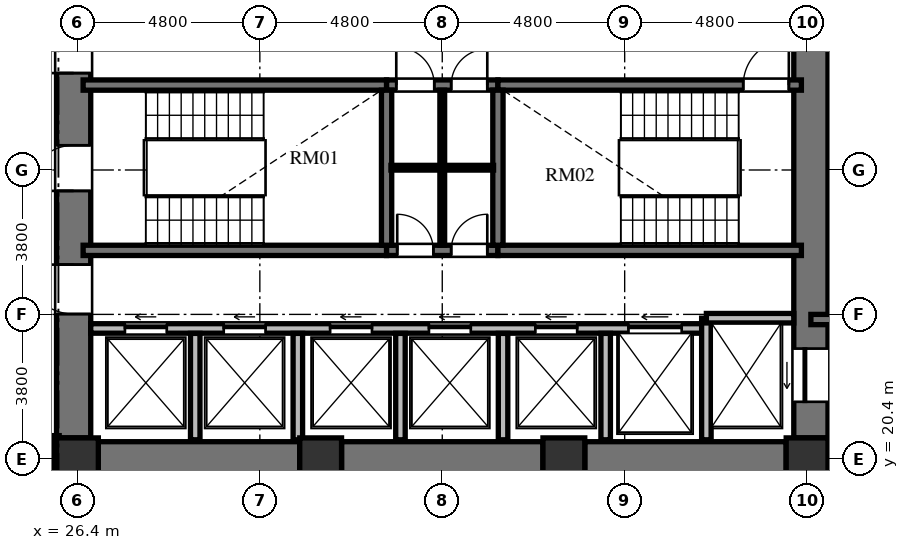
"""IFC4 building model, lengths in metres.
Left out: names, types, materials, properties, quantities, classifications, styles, units other than length and angle.
Written with IfcOpenShell. Run it as: python <this file> out.ifc"""

import sys

from ifc_helpers import new_model, si_unit, direction, frame, frame_2d, origin, origin_2d, place, context, subcontext, project, spatial, rectangle, extrude, element, fill, save


model = new_model("IFC4")
c1 = context("Model", 3, precision=1e-05, world=origin(), true_north=direction((0.0, 1.0)))
c2 = subcontext(c1, "Body", "Model", "MODEL_VIEW")
j1 = project(units=[si_unit("LENGTHUNIT", "METRE"), si_unit("PLANEANGLEUNIT", "RADIAN")], contexts=[c1])
p1 = place(None, origin())
s1 = spatial("IfcSite", under=j1, at=p1, CompositionType="ELEMENT")
p2 = place(p1, origin())
s2 = spatial("IfcBuilding", under=s1, at=p2, CompositionType="ELEMENT")
p3 = place(p2, frame((0.0, 0.0, 39.792)))
s3 = spatial("IfcBuildingStorey", under=s2, at=p3, CompositionType="ELEMENT", Elevation=39.792)
for number, where, z_axis, x_axis in (
    (1, (26.4, 20.4, 0.0), (0.0, 0.0, 1.0), (1.0, 0.0, 0.0)),
    (2, (32.8, 20.4, 0.0), (0.0, 0.0, 1.0), (1.0, 0.0, 0.0)),
    (3, (39.2, 20.4, 0.0), (0.0, 0.0, 1.0), (1.0, 0.0, 0.0)),
    (4, (45.6, 20.4, 0.0), (0.0, 0.0, 1.0), (1.0, 0.0, 0.0)),
):
    element("IfcColumn", number, at=place(p3, frame(where, z_axis=z_axis, x_axis=x_axis)), inside=s3, PredefinedType="COLUMN", context=c2, shape_type="SweptSolid", body=[
        extrude(rectangle(XDim=1.1, YDim=1.1, at=origin_2d()), origin(), (0.0, 0.0, 1.0), 3.648),
    ])
p4 = place(p3, frame((26.3, 20.95, 0.0), z_axis=(0.0, 0.0, 1.0), x_axis=(0.0, 1.0, 0.0)))
e5 = element("IfcWall", 5, at=p4, inside=s3, PredefinedType="SHEAR", context=c2, shape_type="SweptSolid", body=[
    extrude(rectangle(XDim=14.1, YDim=0.9, at=frame_2d((7.05, 0.0))), origin(), (0.0, 0.0, 1.0), 3.648),
])
p5 = place(p4, frame((6.5, 0.0, 0.0)))
e6 = element("IfcOpeningElement", 6, at=p5, cuts=e5, PredefinedType="OPENING", context=c2, shape_type="SweptSolid", body=[
    extrude(rectangle(XDim=1.2, YDim=2.15, at=frame_2d((0.6, 1.075))), frame((0.0, 0.46, 0.0), z_axis=(0.0, -1.0, 0.0), x_axis=(1.0, 0.0, 0.0)), (0.0, 0.0, 1.0), 0.92),
])
p6 = place(p4, frame((9.6, 0.0, 0.0)))
e7 = element("IfcOpeningElement", 7, at=p6, cuts=e5, PredefinedType="OPENING", context=c2, shape_type="SweptSolid", body=[
    extrude(rectangle(XDim=1.3, YDim=2.2, at=frame_2d((0.65, 1.1))), frame((0.0, 0.46, 0.0), z_axis=(0.0, -1.0, 0.0), x_axis=(1.0, 0.0, 0.0)), (0.0, 0.0, 1.0), 0.92),
])
p7 = place(p4, frame((3.26, 0.0, 0.0)))
e8 = element("IfcOpeningElement", 8, at=p7, cuts=e5, PredefinedType="OPENING", context=c2, shape_type="SweptSolid", body=[
    extrude(rectangle(XDim=1.3, YDim=2.2, at=frame_2d((0.65, 1.1))), frame((0.0, 0.46, 0.0), z_axis=(0.0, -1.0, 0.0), x_axis=(1.0, 0.0, 0.0)), (0.0, 0.0, 1.0), 0.92),
])
p8 = place(p3, frame((45.7, 20.95, 0.0), z_axis=(0.0, 0.0, 1.0), x_axis=(0.0, 1.0, 0.0)))
e9 = element("IfcWall", 9, at=p8, inside=s3, PredefinedType="SHEAR", context=c2, shape_type="SweptSolid", body=[
    extrude(rectangle(XDim=14.1, YDim=0.9, at=frame_2d((7.05, 0.0))), origin(), (0.0, 0.0, 1.0), 3.648),
])
p9 = place(p8, frame((11.75, 0.0, 0.0)))
e10 = element("IfcOpeningElement", 10, at=p9, cuts=e9, PredefinedType="OPENING", context=c2, shape_type="SweptSolid", body=[
    extrude(rectangle(XDim=1.4, YDim=2.3, at=frame_2d((0.7, 1.15))), frame((0.0, 0.46, 0.0), z_axis=(0.0, -1.0, 0.0), x_axis=(1.0, 0.0, 0.0)), (0.0, 0.0, 1.0), 0.92),
])
p10 = place(p8, frame((0.95, 0.0, 0.0)))
e11 = element("IfcOpeningElement", 11, at=p10, cuts=e9, PredefinedType="OPENING", context=c2, shape_type="SweptSolid", body=[
    extrude(rectangle(XDim=1.4, YDim=2.3, at=frame_2d((0.7, 1.15))), frame((0.0, 0.46, 0.0), z_axis=(0.0, -1.0, 0.0), x_axis=(1.0, 0.0, 0.0)), (0.0, 0.0, 1.0), 0.92),
])
p11 = place(p3, frame((26.95, 20.4, 0.0), z_axis=(0.0, 0.0, 1.0), x_axis=(1.0, 0.0, 0.0)))
e12 = element("IfcWall", 12, at=p11, inside=s3, PredefinedType="SHEAR", context=c2, shape_type="SweptSolid", body=[
    extrude(rectangle(XDim=5.3, YDim=0.9, at=frame_2d((2.65, 0.0))), origin(), (0.0, 0.0, 1.0), 3.648),
])
p12 = place(p3, frame((33.35, 20.4, 0.0), z_axis=(0.0, 0.0, 1.0), x_axis=(1.0, 0.0, 0.0)))
e13 = element("IfcWall", 13, at=p12, inside=s3, PredefinedType="SHEAR", context=c2, shape_type="SweptSolid", body=[
    extrude(rectangle(XDim=5.3, YDim=0.9, at=frame_2d((2.65, 0.0))), origin(), (0.0, 0.0, 1.0), 3.648),
])
p13 = place(p3, frame((39.75, 20.4, 0.0), z_axis=(0.0, 0.0, 1.0), x_axis=(1.0, 0.0, 0.0)))
e14 = element("IfcWall", 14, at=p13, inside=s3, PredefinedType="SHEAR", context=c2, shape_type="SweptSolid", body=[
    extrude(rectangle(XDim=5.3, YDim=0.9, at=frame_2d((2.65, 0.0))), origin(), (0.0, 0.0, 1.0), 3.648),
])
p14 = place(p3, frame((26.55, 30.235, 0.0), z_axis=(0.0, 0.0, 1.0), x_axis=(1.0, 0.0, 0.0)))
e15 = element("IfcWall", 15, at=p14, inside=s3, PredefinedType="SHEAR", context=c2, shape_type="SweptSolid", body=[
    extrude(rectangle(XDim=7.985, YDim=0.27, at=frame_2d((3.992, 0.0))), origin(), (0.0, 0.0, 1.0), 3.648),
])
p15 = place(p3, frame((34.535, 30.235, 0.0), z_axis=(0.0, 0.0, 1.0), x_axis=(1.0, 0.0, 0.0)))
e16 = element("IfcWall", 16, at=p15, inside=s3, PredefinedType="SHEAR", context=c2, shape_type="SweptSolid", body=[
    extrude(rectangle(XDim=2.93, YDim=0.27, at=frame_2d((1.465, 0.0))), origin(), (0.0, 0.0, 1.0), 3.648),
])
p16 = place(p15, frame((0.255, 0.0, 0.0)))
e17 = element("IfcOpeningElement", 17, at=p16, cuts=e16, PredefinedType="OPENING", context=c2, shape_type="SweptSolid", body=[
    extrude(rectangle(XDim=1.0, YDim=2.1, at=frame_2d((0.5, 1.05))), frame((0.0, 0.145, 0.0), z_axis=(0.0, -1.0, 0.0), x_axis=(1.0, 0.0, 0.0)), (0.0, 0.0, 1.0), 0.29),
])
p17 = place(p15, frame((1.7, 0.0, 0.0)))
e18 = element("IfcOpeningElement", 18, at=p17, cuts=e16, PredefinedType="OPENING", context=c2, shape_type="SweptSolid", body=[
    extrude(rectangle(XDim=0.95, YDim=2.1, at=frame_2d((0.475, 1.05))), frame((0.0, 0.145, 0.0), z_axis=(0.0, -1.0, 0.0), x_axis=(1.0, 0.0, 0.0)), (0.0, 0.0, 1.0), 0.29),
])
p18 = place(p3, frame((37.465, 30.235, 0.0), z_axis=(0.0, 0.0, 1.0), x_axis=(1.0, 0.0, 0.0)))
e19 = element("IfcWall", 19, at=p18, inside=s3, PredefinedType="SHEAR", context=c2, shape_type="SweptSolid", body=[
    extrude(rectangle(XDim=7.985, YDim=0.27, at=frame_2d((3.992, 0.0))), origin(), (0.0, 0.0, 1.0), 3.648),
])
p19 = place(p18, frame((6.455, 0.0, 0.0)))
e20 = element("IfcOpeningElement", 20, at=p19, cuts=e19, PredefinedType="OPENING", context=c2, shape_type="SweptSolid", body=[
    extrude(rectangle(XDim=1.2, YDim=2.15, at=frame_2d((0.6, 1.075))), frame((0.0, 0.145, 0.0), z_axis=(0.0, -1.0, 0.0), x_axis=(1.0, 0.0, 0.0)), (0.0, 0.0, 1.0), 0.29),
])
p20 = place(p3, frame((26.55, 25.885, 0.0), z_axis=(0.0, 0.0, 1.0), x_axis=(1.0, 0.0, 0.0)))
e21 = element("IfcWall", 21, at=p20, inside=s3, PredefinedType="SHEAR", context=c2, shape_type="SweptSolid", body=[
    extrude(rectangle(XDim=7.985, YDim=0.27, at=frame_2d((3.992, 0.0))), origin(), (0.0, 0.0, 1.0), 3.648),
])
p21 = place(p3, frame((34.535, 25.885, 0.0), z_axis=(0.0, 0.0, 1.0), x_axis=(1.0, 0.0, 0.0)))
e22 = element("IfcWall", 22, at=p21, inside=s3, PredefinedType="SHEAR", context=c2, shape_type="SweptSolid", body=[
    extrude(rectangle(XDim=2.93, YDim=0.27, at=frame_2d((1.465, 0.0))), origin(), (0.0, 0.0, 1.0), 3.648),
])
p22 = place(p21, frame((0.28, 0.0, 0.0)))
e23 = element("IfcOpeningElement", 23, at=p22, cuts=e22, PredefinedType="OPENING", context=c2, shape_type="SweptSolid", body=[
    extrude(rectangle(XDim=0.95, YDim=2.1, at=frame_2d((0.475, 1.05))), frame((0.0, 0.145, 0.0), z_axis=(0.0, -1.0, 0.0), x_axis=(1.0, 0.0, 0.0)), (0.0, 0.0, 1.0), 0.29),
])
p23 = place(p21, frame((1.7, 0.0, 0.0)))
e24 = element("IfcOpeningElement", 24, at=p23, cuts=e22, PredefinedType="OPENING", context=c2, shape_type="SweptSolid", body=[
    extrude(rectangle(XDim=0.95, YDim=2.1, at=frame_2d((0.475, 1.05))), frame((0.0, 0.145, 0.0), z_axis=(0.0, -1.0, 0.0), x_axis=(1.0, 0.0, 0.0)), (0.0, 0.0, 1.0), 0.29),
])
p24 = place(p3, frame((37.465, 25.885, 0.0), z_axis=(0.0, 0.0, 1.0), x_axis=(1.0, 0.0, 0.0)))
e25 = element("IfcWall", 25, at=p24, inside=s3, PredefinedType="SHEAR", context=c2, shape_type="SweptSolid", body=[
    extrude(rectangle(XDim=7.985, YDim=0.27, at=frame_2d((3.992, 0.0))), origin(), (0.0, 0.0, 1.0), 3.648),
])
for number, where, z_axis, x_axis in (
    (26, (34.535, 26.02, 0.0), (0.0, 0.0, 1.0), (0.0, 1.0, 0.0)),
    (27, (37.465, 26.02, 0.0), (0.0, 0.0, 1.0), (0.0, 1.0, 0.0)),
):
    element("IfcWall", number, at=place(p3, frame(where, z_axis=z_axis, x_axis=x_axis)), inside=s3, PredefinedType="SHEAR", context=c2, shape_type="SweptSolid", body=[
        extrude(rectangle(XDim=4.08, YDim=0.27, at=frame_2d((2.04, 0.0))), origin(), (0.0, 0.0, 1.0), 3.648),
    ])
p25 = place(p3, frame((34.65, 28.06, 0.0), z_axis=(0.0, 0.0, 1.0), x_axis=(1.0, 0.0, 0.0)))
e28 = element("IfcWall", 28, at=p25, inside=s3, PredefinedType="PARTITIONING", context=c2, shape_type="SweptSolid", body=[
    extrude(rectangle(XDim=2.7, YDim=0.125, at=frame_2d((1.35, 0.0))), origin(), (0.0, 0.0, 1.0), 3.428),
])
p26 = place(p3, frame((36.0, 26.02, 0.0), z_axis=(0.0, 0.0, 1.0), x_axis=(0.0, 1.0, 0.0)))
e29 = element("IfcWall", 29, at=p26, inside=s3, PredefinedType="PARTITIONING", context=c2, shape_type="SweptSolid", body=[
    extrude(rectangle(XDim=4.08, YDim=0.125, at=frame_2d((2.04, 0.0))), origin(), (0.0, 0.0, 1.0), 3.428),
])
p27 = place(p3, frame((26.75, 23.83, 0.0), z_axis=(0.0, 0.0, 1.0), x_axis=(1.0, 0.0, 0.0)))
e30 = element("IfcWall", 30, at=p27, inside=s3, PredefinedType="SOLIDWALL", context=c2, shape_type="SweptSolid", body=[
    extrude(rectangle(XDim=16.2, YDim=0.25, at=frame_2d((8.1, 0.0))), origin(), (0.0, 0.0, 1.0), 3.428),
])
p28 = place(p27, frame((0.9, 0.0, 0.0)))
e31 = element("IfcOpeningElement", 31, at=p28, cuts=e30, PredefinedType="OPENING", context=c2, shape_type="SweptSolid", body=[
    extrude(rectangle(XDim=1.1, YDim=2.2, at=frame_2d((0.55, 1.1))), frame((0.0, 0.135, 0.0), z_axis=(0.0, -1.0, 0.0), x_axis=(1.0, 0.0, 0.0)), (0.0, 0.0, 1.0), 0.27),
])
p29 = place(p27, frame((3.5, 0.0, 0.0)))
e32 = element("IfcOpeningElement", 32, at=p29, cuts=e30, PredefinedType="OPENING", context=c2, shape_type="SweptSolid", body=[
    extrude(rectangle(XDim=1.1, YDim=2.2, at=frame_2d((0.55, 1.1))), frame((0.0, 0.135, 0.0), z_axis=(0.0, -1.0, 0.0), x_axis=(1.0, 0.0, 0.0)), (0.0, 0.0, 1.0), 0.27),
])
p30 = place(p27, frame((6.3, 0.0, 0.0)))
e33 = element("IfcOpeningElement", 33, at=p30, cuts=e30, PredefinedType="OPENING", context=c2, shape_type="SweptSolid", body=[
    extrude(rectangle(XDim=1.1, YDim=2.2, at=frame_2d((0.55, 1.1))), frame((0.0, 0.135, 0.0), z_axis=(0.0, -1.0, 0.0), x_axis=(1.0, 0.0, 0.0)), (0.0, 0.0, 1.0), 0.27),
])
p31 = place(p27, frame((8.9, 0.0, 0.0)))
e34 = element("IfcOpeningElement", 34, at=p31, cuts=e30, PredefinedType="OPENING", context=c2, shape_type="SweptSolid", body=[
    extrude(rectangle(XDim=1.1, YDim=2.2, at=frame_2d((0.55, 1.1))), frame((0.0, 0.135, 0.0), z_axis=(0.0, -1.0, 0.0), x_axis=(1.0, 0.0, 0.0)), (0.0, 0.0, 1.0), 0.27),
])
p32 = place(p27, frame((11.7, 0.0, 0.0)))
e35 = element("IfcOpeningElement", 35, at=p32, cuts=e30, PredefinedType="OPENING", context=c2, shape_type="SweptSolid", body=[
    extrude(rectangle(XDim=1.1, YDim=2.2, at=frame_2d((0.55, 1.1))), frame((0.0, 0.135, 0.0), z_axis=(0.0, -1.0, 0.0), x_axis=(1.0, 0.0, 0.0)), (0.0, 0.0, 1.0), 0.27),
])
p33 = place(p27, frame((14.15, 0.0, 0.0)))
e36 = element("IfcOpeningElement", 36, at=p33, cuts=e30, PredefinedType="OPENING", context=c2, shape_type="SweptSolid", body=[
    extrude(rectangle(XDim=1.4, YDim=2.3, at=frame_2d((0.7, 1.15))), frame((0.0, 0.135, 0.0), z_axis=(0.0, -1.0, 0.0), x_axis=(1.0, 0.0, 0.0)), (0.0, 0.0, 1.0), 0.27),
])
p34 = place(p3, frame((42.95, 20.9, 0.0), z_axis=(0.0, 0.0, 1.0), x_axis=(0.0, 1.0, 0.0)))
e37 = element("IfcWall", 37, at=p34, inside=s3, PredefinedType="SOLIDWALL", context=c2, shape_type="SweptSolid", body=[
    extrude(rectangle(XDim=3.2, YDim=0.25, at=frame_2d((1.6, 0.0))), origin(), (0.0, 0.0, 1.0), 3.428),
])
p35 = place(p3, frame((42.95, 24.1, 0.0), z_axis=(0.0, 0.0, 1.0), x_axis=(1.0, 0.0, 0.0)))
e38 = element("IfcWall", 38, at=p35, inside=s3, PredefinedType="SOLIDWALL", context=c2, shape_type="SweptSolid", body=[
    extrude(rectangle(XDim=2.3, YDim=0.25, at=frame_2d((1.15, 0.0))), origin(), (0.0, 0.0, 1.0), 3.428),
])
for number, where, z_axis, x_axis in (
    (39, (29.5, 20.9, 0.0), (0.0, 0.0, 1.0), (0.0, 1.0, 0.0)),
    (40, (32.2, 20.9, 0.0), (0.0, 0.0, 1.0), (0.0, 1.0, 0.0)),
    (41, (34.9, 20.9, 0.0), (0.0, 0.0, 1.0), (0.0, 1.0, 0.0)),
    (42, (37.6, 20.9, 0.0), (0.0, 0.0, 1.0), (0.0, 1.0, 0.0)),
    (43, (40.3, 20.9, 0.0), (0.0, 0.0, 1.0), (0.0, 1.0, 0.0)),
):
    element("IfcWall", number, at=place(p3, frame(where, z_axis=z_axis, x_axis=x_axis)), inside=s3, PredefinedType="SOLIDWALL", context=c2, shape_type="SweptSolid", body=[
        extrude(rectangle(XDim=2.8, YDim=0.25, at=frame_2d((1.4, 0.0))), origin(), (0.0, 0.0, 1.0), 3.428),
    ])
p36 = place(p3, frame((45.7, 24.065, 0.0), z_axis=(0.0, 0.0, 1.0), x_axis=(1.0, 0.0, 0.0)))
e44 = element("IfcWall", 44, at=p36, inside=s3, PredefinedType="SHEAR", context=c2, shape_type="SweptSolid", body=[
    extrude(rectangle(XDim=4.715, YDim=0.27, at=frame_2d((2.357, 0.0))), origin(), (0.0, 0.0, 1.0), 3.648),
])
p37 = place(p3, frame((45.7, 20.02, 0.0), z_axis=(0.0, 0.0, 1.0), x_axis=(1.0, 0.0, 0.0)))
e45 = element("IfcWall", 45, at=p37, inside=s3, PredefinedType="SOLIDWALL", context=c2, shape_type="SweptSolid", body=[
    extrude(rectangle(XDim=4.715, YDim=0.25, at=frame_2d((2.357, 0.0))), origin(), (0.0, 0.0, 1.0), 2.813),
])
p38 = place(p3, frame((25.83, 21.01, 0.0), z_axis=(0.0, 0.0, 1.0), x_axis=(0.0, -1.0, 0.0)))
e46 = element("IfcWall", 46, at=p38, inside=s3, PredefinedType="PARTITIONING", context=c2, shape_type="SweptSolid", body=[
    extrude(rectangle(XDim=1.22, YDim=0.18, at=frame_2d((0.61, 0.0))), origin(), (0.0, 0.0, 1.0), 3.428),
])
p39 = place(p5, origin())
e47 = element("IfcDoor", 47, at=p39, inside=s3, OperationType="SINGLE_SWING_LEFT", PredefinedType="DOOR", context=c2, shape_type="SweptSolid", body=[
    extrude(rectangle(XDim=1.2, YDim=2.15, at=frame_2d((0.6, 1.075))), frame((0.0, 0.025, 0.0), z_axis=(0.0, -1.0, 0.0), x_axis=(1.0, 0.0, 0.0)), (0.0, 0.0, 1.0), 0.05),
])
fill(e6, e47)
p40 = place(p19, origin())
e48 = element("IfcDoor", 48, at=p40, inside=s3, OperationType="SINGLE_SWING_RIGHT", PredefinedType="DOOR", context=c2, shape_type="SweptSolid", body=[
    extrude(rectangle(XDim=1.2, YDim=2.15, at=frame_2d((0.6, 1.075))), frame((0.0, 0.025, 0.0), z_axis=(0.0, -1.0, 0.0), x_axis=(1.0, 0.0, 0.0)), (0.0, 0.0, 1.0), 0.05),
])
fill(e20, e48)
p41 = place(p22, origin())
e49 = element("IfcDoor", 49, at=p41, inside=s3, OperationType="SINGLE_SWING_LEFT", PredefinedType="DOOR", context=c2, shape_type="SweptSolid", body=[
    extrude(rectangle(XDim=0.95, YDim=2.1, at=frame_2d((0.475, 1.05))), frame((0.0, 0.025, 0.0), z_axis=(0.0, -1.0, 0.0), x_axis=(1.0, 0.0, 0.0)), (0.0, 0.0, 1.0), 0.05),
])
fill(e23, e49)
p42 = place(p23, origin())
e50 = element("IfcDoor", 50, at=p42, inside=s3, OperationType="SINGLE_SWING_RIGHT", PredefinedType="DOOR", context=c2, shape_type="SweptSolid", body=[
    extrude(rectangle(XDim=0.95, YDim=2.1, at=frame_2d((0.475, 1.05))), frame((0.0, 0.025, 0.0), z_axis=(0.0, -1.0, 0.0), x_axis=(1.0, 0.0, 0.0)), (0.0, 0.0, 1.0), 0.05),
])
fill(e24, e50)
p43 = place(p16, origin())
e51 = element("IfcDoor", 51, at=p43, inside=s3, OperationType="SINGLE_SWING_LEFT", PredefinedType="DOOR", context=c2, shape_type="SweptSolid", body=[
    extrude(rectangle(XDim=1.0, YDim=2.1, at=frame_2d((0.5, 1.05))), frame((0.0, 0.025, 0.0), z_axis=(0.0, -1.0, 0.0), x_axis=(1.0, 0.0, 0.0)), (0.0, 0.0, 1.0), 0.05),
])
fill(e17, e51)
p44 = place(p17, origin())
e52 = element("IfcDoor", 52, at=p44, inside=s3, OperationType="SINGLE_SWING_RIGHT", PredefinedType="DOOR", context=c2, shape_type="SweptSolid", body=[
    extrude(rectangle(XDim=0.95, YDim=2.1, at=frame_2d((0.475, 1.05))), frame((0.0, 0.025, 0.0), z_axis=(0.0, -1.0, 0.0), x_axis=(1.0, 0.0, 0.0)), (0.0, 0.0, 1.0), 0.05),
])
fill(e18, e52)
p45 = place(p6, origin())
e53 = element("IfcDoor", 53, at=p45, inside=s3, OperationType="SINGLE_SWING_LEFT", PredefinedType="DOOR", context=c2, shape_type="SweptSolid", body=[
    extrude(rectangle(XDim=1.3, YDim=2.2, at=frame_2d((0.65, 1.1))), frame((0.0, 0.025, 0.0), z_axis=(0.0, -1.0, 0.0), x_axis=(1.0, 0.0, 0.0)), (0.0, 0.0, 1.0), 0.05),
])
fill(e7, e53)
p46 = place(p7, origin())
e54 = element("IfcDoor", 54, at=p46, inside=s3, OperationType="SINGLE_SWING_RIGHT", PredefinedType="DOOR", context=c2, shape_type="SweptSolid", body=[
    extrude(rectangle(XDim=1.3, YDim=2.2, at=frame_2d((0.65, 1.1))), frame((0.0, 0.025, 0.0), z_axis=(0.0, -1.0, 0.0), x_axis=(1.0, 0.0, 0.0)), (0.0, 0.0, 1.0), 0.05),
])
fill(e8, e54)
p47 = place(p28, origin())
e55 = element("IfcDoor", 55, at=p47, inside=s3, OperationType="SLIDING_TO_LEFT", PredefinedType="DOOR", context=c2, shape_type="SweptSolid", body=[
    extrude(rectangle(XDim=1.1, YDim=2.2, at=frame_2d((0.55, 1.1))), frame((0.0, 0.025, 0.0), z_axis=(0.0, -1.0, 0.0), x_axis=(1.0, 0.0, 0.0)), (0.0, 0.0, 1.0), 0.05),
])
fill(e31, e55)
p48 = place(p29, origin())
e56 = element("IfcDoor", 56, at=p48, inside=s3, OperationType="SLIDING_TO_LEFT", PredefinedType="DOOR", context=c2, shape_type="SweptSolid", body=[
    extrude(rectangle(XDim=1.1, YDim=2.2, at=frame_2d((0.55, 1.1))), frame((0.0, 0.025, 0.0), z_axis=(0.0, -1.0, 0.0), x_axis=(1.0, 0.0, 0.0)), (0.0, 0.0, 1.0), 0.05),
])
fill(e32, e56)
p49 = place(p30, origin())
e57 = element("IfcDoor", 57, at=p49, inside=s3, OperationType="SLIDING_TO_LEFT", PredefinedType="DOOR", context=c2, shape_type="SweptSolid", body=[
    extrude(rectangle(XDim=1.1, YDim=2.2, at=frame_2d((0.55, 1.1))), frame((0.0, 0.025, 0.0), z_axis=(0.0, -1.0, 0.0), x_axis=(1.0, 0.0, 0.0)), (0.0, 0.0, 1.0), 0.05),
])
fill(e33, e57)
p50 = place(p31, origin())
e58 = element("IfcDoor", 58, at=p50, inside=s3, OperationType="SLIDING_TO_LEFT", PredefinedType="DOOR", context=c2, shape_type="SweptSolid", body=[
    extrude(rectangle(XDim=1.1, YDim=2.2, at=frame_2d((0.55, 1.1))), frame((0.0, 0.025, 0.0), z_axis=(0.0, -1.0, 0.0), x_axis=(1.0, 0.0, 0.0)), (0.0, 0.0, 1.0), 0.05),
])
fill(e34, e58)
p51 = place(p32, origin())
e59 = element("IfcDoor", 59, at=p51, inside=s3, OperationType="SLIDING_TO_LEFT", PredefinedType="DOOR", context=c2, shape_type="SweptSolid", body=[
    extrude(rectangle(XDim=1.1, YDim=2.2, at=frame_2d((0.55, 1.1))), frame((0.0, 0.025, 0.0), z_axis=(0.0, -1.0, 0.0), x_axis=(1.0, 0.0, 0.0)), (0.0, 0.0, 1.0), 0.05),
])
fill(e35, e59)
p52 = place(p10, origin())
e60 = element("IfcDoor", 60, at=p52, inside=s3, OperationType="SLIDING_TO_LEFT", PredefinedType="DOOR", context=c2, shape_type="SweptSolid", body=[
    extrude(rectangle(XDim=1.4, YDim=2.3, at=frame_2d((0.7, 1.15))), frame((0.0, 0.025, 0.0), z_axis=(0.0, -1.0, 0.0), x_axis=(1.0, 0.0, 0.0)), (0.0, 0.0, 1.0), 0.05),
])
fill(e11, e60)
p53 = place(p33, origin())
e61 = element("IfcDoor", 61, at=p53, inside=s3, OperationType="SLIDING_TO_LEFT", PredefinedType="DOOR", context=c2, shape_type="SweptSolid", body=[
    extrude(rectangle(XDim=1.4, YDim=2.3, at=frame_2d((0.7, 1.15))), frame((0.0, 0.025, 0.0), z_axis=(0.0, -1.0, 0.0), x_axis=(1.0, 0.0, 0.0)), (0.0, 0.0, 1.0), 0.05),
])
fill(e36, e61)
save(model, sys.argv[1])
